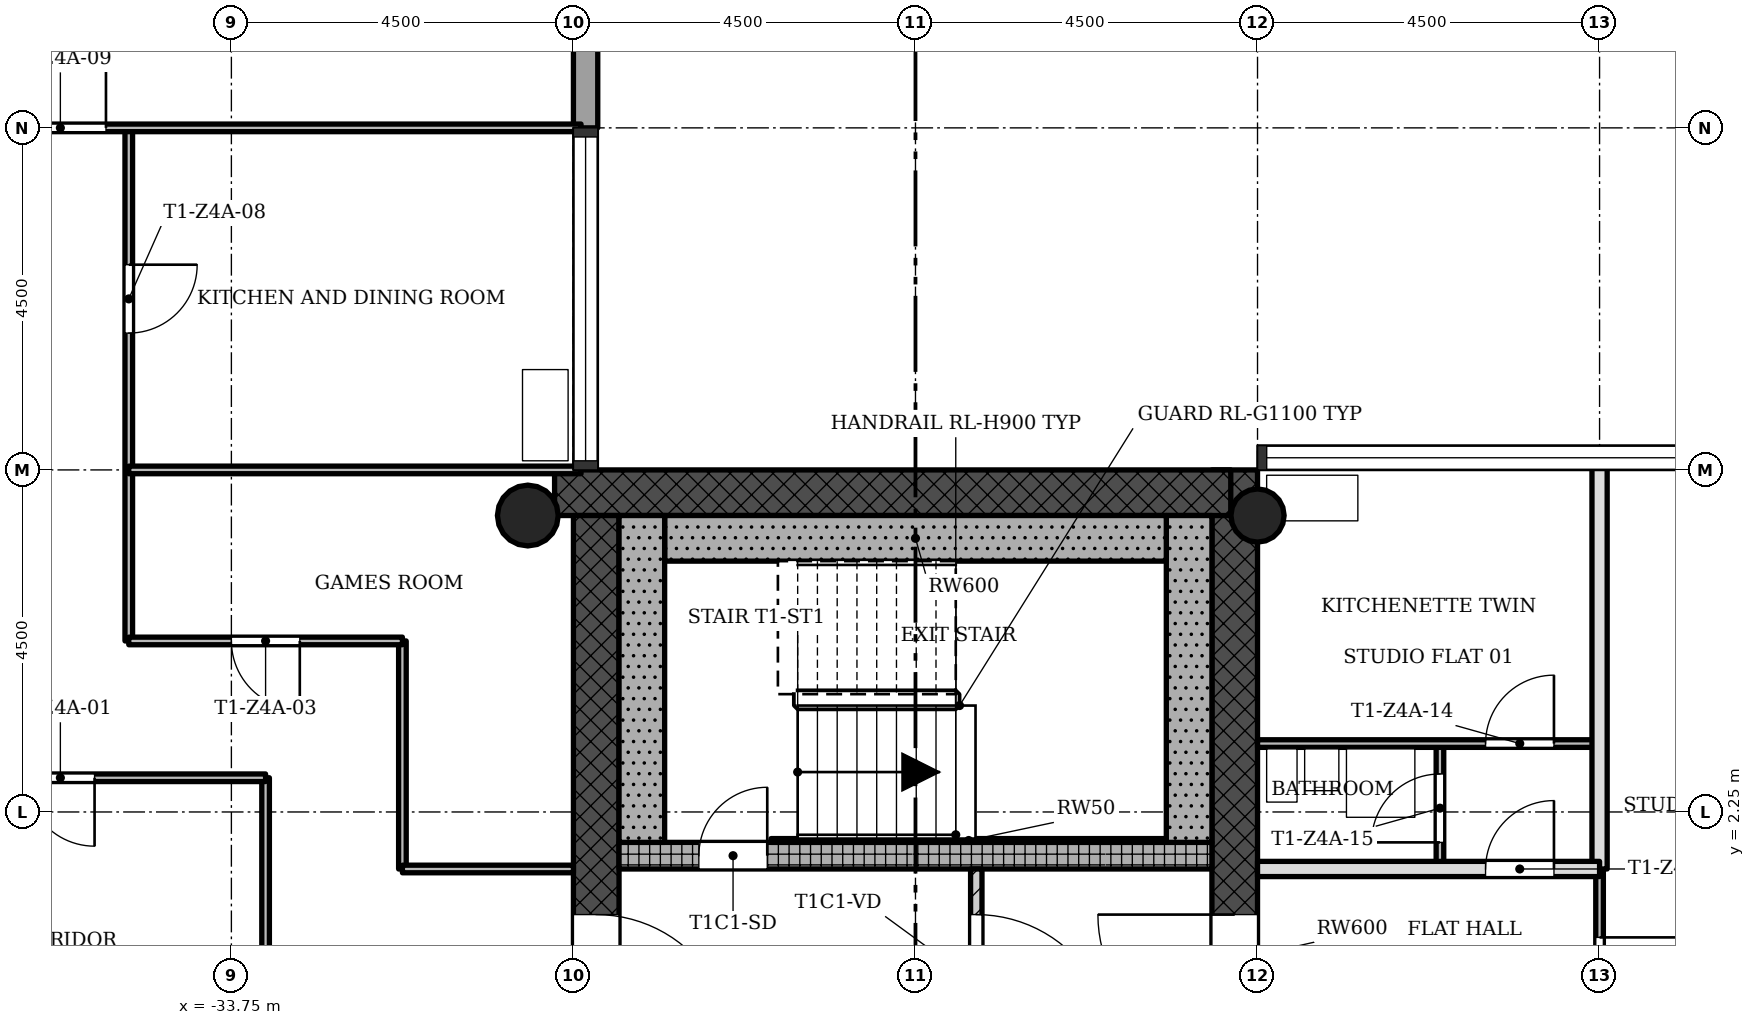
"""IFC4 building model, lengths in metres.
Left out: names, types, materials, properties, quantities, classifications, styles, units other than length and angle.
Written with IfcOpenShell. Run it as: python <this file> out.ifc"""

import sys

from ifc_helpers import new_model, si_unit, direction, frame, frame_2d, origin, origin_2d, place, context, subcontext, project, spatial, rectangle, hollow_circle, extrude, element, fill, save


model = new_model("IFC4")
c1 = context("Model", 3, precision=1e-05, world=origin(), true_north=direction((0.0, 1.0)))
c2 = subcontext(c1, "Body", "Model", "MODEL_VIEW")
j1 = project(units=[si_unit("LENGTHUNIT", "METRE"), si_unit("PLANEANGLEUNIT", "RADIAN")], contexts=[c1])
p1 = place(None, origin())
s1 = spatial("IfcSite", under=j1, at=p1, CompositionType="ELEMENT")
p2 = place(p1, origin())
s2 = spatial("IfcBuilding", under=s1, at=p2, CompositionType="ELEMENT")
p3 = place(p2, frame((0.0, 0.0, 226.6)))
s3 = spatial("IfcBuildingStorey", under=s2, at=p3, CompositionType="ELEMENT", Elevation=226.6)
p4 = place(p3, frame((-20.55, -6.15, 0.0), z_axis=(0.0, 0.0, 1.0), x_axis=(0.0, 1.0, 0.0)))
e1 = element("IfcWall", 1, at=p4, inside=s3, PredefinedType="SHEAR", context=c2, shape_type="SweptSolid", body=[
    extrude(rectangle(XDim=12.9, YDim=0.6, at=frame_2d((6.45, 0.0))), origin(), (0.0, 0.0, 1.0), 3.4),
])
p5 = place(p4, frame((5.25, 0.0, 0.0)))
e2 = element("IfcOpeningElement", 2, at=p5, cuts=e1, PredefinedType="OPENING", context=c2, shape_type="SweptSolid", body=[
    extrude(rectangle(XDim=1.8, YDim=2.1, at=frame_2d((0.9, 1.05))), frame((0.0, 0.31, 0.0), z_axis=(0.0, -1.0, 0.0), x_axis=(1.0, 0.0, 0.0)), (0.0, 0.0, 1.0), 0.62),
])
p6 = place(p3, frame((-20.602, 6.45, 0.0), z_axis=(0.0, 0.0, 1.0), x_axis=(-1.0, 0.0, 0.0)))
e3 = element("IfcWall", 3, at=p6, inside=s3, PredefinedType="SHEAR", context=c2, shape_type="SweptSolid", body=[
    extrude(rectangle(XDim=8.896, YDim=0.6, at=frame_2d((4.448, 0.0))), origin(), (0.0, 0.0, 1.0), 3.4),
])
p7 = place(p3, frame((-28.95, 6.15, 0.0), z_axis=(0.0, 0.0, 1.0), x_axis=(0.0, -1.0, 0.0)))
e4 = element("IfcWall", 4, at=p7, inside=s3, PredefinedType="SHEAR", context=c2, shape_type="SweptSolid", body=[
    extrude(rectangle(XDim=12.9, YDim=0.6, at=frame_2d((6.45, 0.0))), origin(), (0.0, 0.0, 1.0), 3.4),
])
p8 = place(p7, frame((5.25, 0.0, 0.0)))
e5 = element("IfcOpeningElement", 5, at=p8, cuts=e4, PredefinedType="OPENING", context=c2, shape_type="SweptSolid", body=[
    extrude(rectangle(XDim=1.8, YDim=2.1, at=frame_2d((0.9, 1.05))), frame((0.0, 0.31, 0.0), z_axis=(0.0, -1.0, 0.0), x_axis=(1.0, 0.0, 0.0)), (0.0, 0.0, 1.0), 0.62),
])
p9 = place(p3, frame((-28.65, 1.675, 0.0), z_axis=(0.0, 0.0, 1.0), x_axis=(1.0, 0.0, 0.0)))
e6 = element("IfcWall", 6, at=p9, inside=s3, PredefinedType="SHEAR", context=c2, shape_type="SweptSolid", body=[
    extrude(rectangle(XDim=7.8, YDim=0.35, at=frame_2d((3.9, 0.0))), origin(), (0.0, 0.0, 1.0), 3.4),
])
p10 = place(p9, frame((1.05, 0.0, 0.0)))
e7 = element("IfcOpeningElement", 7, at=p10, cuts=e6, PredefinedType="OPENING", context=c2, shape_type="SweptSolid", body=[
    extrude(rectangle(XDim=0.9, YDim=2.1, at=frame_2d((0.45, 1.05))), frame((0.0, 0.185, 0.0), z_axis=(0.0, -1.0, 0.0), x_axis=(1.0, 0.0, 0.0)), (0.0, 0.0, 1.0), 0.37),
])
p11 = place(p3, frame((-20.25, 6.15, 0.0), z_axis=(0.0, 0.0, 1.0), x_axis=(1.0, 0.0, 0.0)))
e8 = element("IfcColumn", 8, at=p11, inside=s3, PredefinedType="COLUMN", context=c2, shape_type="SweptSolid", body=[
    extrude(hollow_circle(Radius=0.35, WallThickness=0.025, at=origin_2d()), origin(), (0.0, 0.0, 1.0), 3.4),
])
p12 = place(p3, frame((-29.85, 6.15, 0.0), z_axis=(0.0, 0.0, 1.0), x_axis=(1.0, 0.0, 0.0)))
e9 = element("IfcColumn", 9, at=p12, inside=s3, PredefinedType="COLUMN", context=c2, shape_type="SweptSolid", body=[
    extrude(hollow_circle(Radius=0.4, WallThickness=0.028, at=origin_2d()), origin(), (0.0, 0.0, 1.0), 3.4),
])
p13 = place(p3, frame((-29.09, 11.25, -0.3), z_axis=(0.0, 0.0, 1.0), x_axis=(0.0, 1.0, 0.0)))
e10 = element("IfcWall", 10, at=p13, inside=s3, PredefinedType="STANDARD", context=c2, shape_type="SweptSolid", body=[
    extrude(rectangle(XDim=1.82, YDim=0.32, at=frame_2d((0.91, 0.0))), origin(), (0.0, 0.0, 1.0), 3.4),
])
p14 = place(p3, frame((-23.95, -1.5, 0.0), z_axis=(0.0, 0.0, 1.0), x_axis=(0.0, 1.0, 0.0)))
e11 = element("IfcWall", 11, at=p14, inside=s3, PredefinedType="PARTITIONING", context=c2, shape_type="SweptSolid", body=[
    extrude(rectangle(XDim=3.0, YDim=0.15, at=frame_2d((1.5, 0.0))), origin(), (0.0, 0.0, 1.0), 3.0),
])
p15 = place(p14, frame((0.6, 0.0, 0.0)))
e12 = element("IfcOpeningElement", 12, at=p15, cuts=e11, PredefinedType="OPENING", context=c2, shape_type="SweptSolid", body=[
    extrude(rectangle(XDim=1.8, YDim=2.1, at=frame_2d((0.9, 1.05))), frame((0.0, 0.085, 0.0), z_axis=(0.0, -1.0, 0.0), x_axis=(1.0, 0.0, 0.0)), (0.0, 0.0, 1.0), 0.17),
])
p16 = place(p3, frame((-35.1, 4.5, 0.0), z_axis=(0.0, 0.0, 1.0), x_axis=(0.0, 1.0, 0.0)))
e13 = element("IfcWall", 13, at=p16, inside=s3, PredefinedType="PARTITIONING", context=c2, shape_type="SweptSolid", body=[
    extrude(rectangle(XDim=6.75, YDim=0.1, at=frame_2d((3.375, 0.0))), origin(), (0.0, 0.0, 1.0), 3.0),
])
p17 = place(p16, frame((4.05, 0.0, 0.0)))
e14 = element("IfcOpeningElement", 14, at=p17, cuts=e13, PredefinedType="OPENING", context=c2, shape_type="SweptSolid", body=[
    extrude(rectangle(XDim=0.9, YDim=2.1, at=frame_2d((0.45, 1.05))), frame((0.0, 0.06, 0.0), z_axis=(0.0, -1.0, 0.0), x_axis=(1.0, 0.0, 0.0)), (0.0, 0.0, 1.0), 0.12),
])
p18 = place(p3, frame((-33.3, -2.7, 0.0), z_axis=(0.0, 0.0, 1.0), x_axis=(0.0, 1.0, 0.0)))
e15 = element("IfcWall", 15, at=p18, inside=s3, PredefinedType="PARTITIONING", context=c2, shape_type="SweptSolid", body=[
    extrude(rectangle(XDim=5.4, YDim=0.1, at=frame_2d((2.7, 0.0))), origin(), (0.0, 0.0, 1.0), 3.0),
])
p19 = place(p3, frame((-31.5, 1.5, 0.0), z_axis=(0.0, 0.0, 1.0), x_axis=(0.0, 1.0, 0.0)))
e16 = element("IfcWall", 16, at=p19, inside=s3, PredefinedType="PARTITIONING", context=c2, shape_type="SweptSolid", body=[
    extrude(rectangle(XDim=3.0, YDim=0.1, at=frame_2d((1.5, 0.0))), origin(), (0.0, 0.0, 1.0), 3.0),
])
p20 = place(p3, frame((-17.85, 1.5, 0.0), z_axis=(0.0, 0.0, 1.0), x_axis=(0.0, 1.0, 0.0)))
e17 = element("IfcWall", 17, at=p20, inside=s3, PredefinedType="PARTITIONING", context=c2, shape_type="SweptSolid", body=[
    extrude(rectangle(XDim=1.65, YDim=0.1, at=frame_2d((0.825, 0.0))), origin(), (0.0, 0.0, 1.0), 3.0),
])
p21 = place(p20, frame((0.35, 0.0, 0.0)))
e18 = element("IfcOpeningElement", 18, at=p21, cuts=e17, PredefinedType="OPENING", context=c2, shape_type="SweptSolid", body=[
    extrude(rectangle(XDim=0.9, YDim=2.1, at=frame_2d((0.45, 1.05))), frame((0.0, 0.06, 0.0), z_axis=(0.0, -1.0, 0.0), x_axis=(1.0, 0.0, 0.0)), (0.0, 0.0, 1.0), 0.12),
])
p22 = place(p3, frame((-15.75, -1.5, 0.0), z_axis=(0.0, 0.0, 1.0), x_axis=(0.0, 1.0, 0.0)))
e19 = element("IfcWall", 19, at=p22, inside=s3, PredefinedType="PARTITIONING", context=c2, shape_type="SweptSolid", body=[
    extrude(rectangle(XDim=3.0, YDim=0.1, at=frame_2d((1.5, 0.0))), origin(), (0.0, 0.0, 1.0), 3.0),
])
p23 = place(p22, frame((0.9, 0.0, 0.0)))
e20 = element("IfcOpeningElement", 20, at=p23, cuts=e19, PredefinedType="OPENING", context=c2, shape_type="SweptSolid", body=[
    extrude(rectangle(XDim=1.2, YDim=2.1, at=frame_2d((0.6, 1.05))), frame((0.0, 0.06, 0.0), z_axis=(0.0, -1.0, 0.0), x_axis=(1.0, 0.0, 0.0)), (0.0, 0.0, 1.0), 0.12),
])
p24 = place(p3, frame((-15.75, 1.5, 0.0), z_axis=(0.0, 0.0, 1.0), x_axis=(0.0, 1.0, 0.0)))
e21 = element("IfcWall", 21, at=p24, inside=s3, PredefinedType="SOLIDWALL", context=c2, shape_type="SweptSolid", body=[
    extrude(rectangle(XDim=5.35, YDim=0.2, at=frame_2d((2.675, 0.0))), origin(), (0.0, 0.0, 1.0), 3.0),
])
p25 = place(p3, frame((-31.5, 1.5, 0.0), z_axis=(0.0, 0.0, 1.0), x_axis=(1.0, 0.0, 0.0)))
e22 = element("IfcWall", 22, at=p25, inside=s3, PredefinedType="PARTITIONING", context=c2, shape_type="SweptSolid", body=[
    extrude(rectangle(XDim=2.25, YDim=0.1, at=frame_2d((1.125, 0.0))), origin(), (0.0, 0.0, 1.0), 3.0),
])
p26 = place(p3, frame((-20.25, 1.5, 0.0), z_axis=(0.0, 0.0, 1.0), x_axis=(1.0, 0.0, 0.0)))
e23 = element("IfcWall", 23, at=p26, inside=s3, PredefinedType="SOLIDWALL", context=c2, shape_type="SweptSolid", body=[
    extrude(rectangle(XDim=4.5, YDim=0.2, at=frame_2d((2.25, 0.0))), origin(), (0.0, 0.0, 1.0), 3.0),
])
p27 = place(p26, frame((3.0, 0.0, 0.0)))
e24 = element("IfcOpeningElement", 24, at=p27, cuts=e23, PredefinedType="OPENING", context=c2, shape_type="SweptSolid", body=[
    extrude(rectangle(XDim=0.9, YDim=2.1, at=frame_2d((0.45, 1.05))), frame((0.0, 0.11, 0.0), z_axis=(0.0, -1.0, 0.0), x_axis=(1.0, 0.0, 0.0)), (0.0, 0.0, 1.0), 0.22),
])
p28 = place(p3, frame((-38.7, 2.7, 0.0), z_axis=(0.0, 0.0, 1.0), x_axis=(1.0, 0.0, 0.0)))
e25 = element("IfcWall", 25, at=p28, inside=s3, PredefinedType="PARTITIONING", context=c2, shape_type="SweptSolid", body=[
    extrude(rectangle(XDim=5.4, YDim=0.1, at=frame_2d((2.7, 0.0))), origin(), (0.0, 0.0, 1.0), 3.0),
])
p29 = place(p28, frame((2.25, 0.0, 0.0)))
e26 = element("IfcOpeningElement", 26, at=p29, cuts=e25, PredefinedType="OPENING", context=c2, shape_type="SweptSolid", body=[
    extrude(rectangle(XDim=0.9, YDim=2.1, at=frame_2d((0.45, 1.05))), frame((0.0, 0.06, 0.0), z_axis=(0.0, -1.0, 0.0), x_axis=(1.0, 0.0, 0.0)), (0.0, 0.0, 1.0), 0.12),
])
p30 = place(p3, frame((-20.25, 3.15, 0.0), z_axis=(0.0, 0.0, 1.0), x_axis=(1.0, 0.0, 0.0)))
e27 = element("IfcWall", 27, at=p30, inside=s3, PredefinedType="PARTITIONING", context=c2, shape_type="SweptSolid", body=[
    extrude(rectangle(XDim=4.5, YDim=0.1, at=frame_2d((2.25, 0.0))), origin(), (0.0, 0.0, 1.0), 3.0),
])
p31 = place(p30, frame((3.0, 0.0, 0.0)))
e28 = element("IfcOpeningElement", 28, at=p31, cuts=e27, PredefinedType="OPENING", context=c2, shape_type="SweptSolid", body=[
    extrude(rectangle(XDim=0.9, YDim=2.1, at=frame_2d((0.45, 1.05))), frame((0.0, 0.06, 0.0), z_axis=(0.0, -1.0, 0.0), x_axis=(1.0, 0.0, 0.0)), (0.0, 0.0, 1.0), 0.12),
])
p32 = place(p3, frame((-35.1, 4.5, 0.0), z_axis=(0.0, 0.0, 1.0), x_axis=(1.0, 0.0, 0.0)))
e29 = element("IfcWall", 29, at=p32, inside=s3, PredefinedType="PARTITIONING", context=c2, shape_type="SweptSolid", body=[
    extrude(rectangle(XDim=3.6, YDim=0.1, at=frame_2d((1.8, 0.0))), origin(), (0.0, 0.0, 1.0), 3.0),
])
p33 = place(p32, frame((1.35, 0.0, 0.0)))
e30 = element("IfcOpeningElement", 30, at=p33, cuts=e29, PredefinedType="OPENING", context=c2, shape_type="SweptSolid", body=[
    extrude(rectangle(XDim=0.9, YDim=2.1, at=frame_2d((0.45, 1.05))), frame((0.0, 0.06, 0.0), z_axis=(0.0, -1.0, 0.0), x_axis=(1.0, 0.0, 0.0)), (0.0, 0.0, 1.0), 0.12),
])
p34 = place(p3, frame((-35.1, 6.75, 0.0), z_axis=(0.0, 0.0, 1.0), x_axis=(1.0, 0.0, 0.0)))
e31 = element("IfcWall", 31, at=p34, inside=s3, PredefinedType="PARTITIONING", context=c2, shape_type="SweptSolid", body=[
    extrude(rectangle(XDim=5.95, YDim=0.1, at=frame_2d((2.975, 0.0))), origin(), (0.0, 0.0, 1.0), 3.0),
])
p35 = place(p3, frame((-42.85, 11.25, 0.0), z_axis=(0.0, 0.0, 1.0), x_axis=(1.0, 0.0, 0.0)))
e32 = element("IfcWall", 32, at=p35, inside=s3, PredefinedType="PARTITIONING", context=c2, shape_type="SweptSolid", body=[
    extrude(rectangle(XDim=13.7, YDim=0.1, at=frame_2d((6.85, 0.0))), origin(), (0.0, 0.0, 1.0), 3.0),
])
p36 = place(p35, frame((6.25, 0.0, 0.0)))
e33 = element("IfcOpeningElement", 33, at=p36, cuts=e32, PredefinedType="OPENING", context=c2, shape_type="SweptSolid", body=[
    extrude(rectangle(XDim=1.2, YDim=2.1, at=frame_2d((0.6, 1.05))), frame((0.0, 0.06, 0.0), z_axis=(0.0, -1.0, 0.0), x_axis=(1.0, 0.0, 0.0)), (0.0, 0.0, 1.0), 0.12),
])
p37 = place(p3, frame((-21.15, 1.85, 0.0), z_axis=(0.0, 0.0, 1.0), x_axis=(0.0, 1.0, 0.0)))
e34 = element("IfcWall", 34, at=p37, inside=s3, PredefinedType="SHEAR", context=c2, shape_type="SweptSolid", body=[
    extrude(rectangle(XDim=4.3, YDim=0.6, at=frame_2d((2.15, 0.0))), origin(), (0.0, 0.0, 1.0), 3.4),
])
p38 = place(p3, frame((-28.05, 5.85, 0.0), z_axis=(0.0, 0.0, 1.0), x_axis=(1.0, 0.0, 0.0)))
e35 = element("IfcWall", 35, at=p38, inside=s3, PredefinedType="SHEAR", context=c2, shape_type="SweptSolid", body=[
    extrude(rectangle(XDim=6.6, YDim=0.6, at=frame_2d((3.3, 0.0))), origin(), (0.0, 0.0, 1.0), 3.4),
])
p39 = place(p3, frame((-28.35, 1.85, 0.0), z_axis=(0.0, 0.0, 1.0), x_axis=(0.0, 1.0, 0.0)))
e36 = element("IfcWall", 36, at=p39, inside=s3, PredefinedType="SHEAR", context=c2, shape_type="SweptSolid", body=[
    extrude(rectangle(XDim=4.3, YDim=0.6, at=frame_2d((2.15, 0.0))), origin(), (0.0, 0.0, 1.0), 3.4),
])
p40 = place(p3, frame((-26.65, 1.875, 0.0), z_axis=(0.0, 0.0, 1.0), x_axis=(1.0, 0.0, 0.0)))
e37 = element("IfcWall", 37, at=p40, inside=s3, PredefinedType="SHEAR", context=c2, shape_type="SweptSolid", body=[
    extrude(rectangle(XDim=5.2, YDim=0.05, at=frame_2d((2.6, 0.0))), origin(), (0.0, 0.0, 1.0), 3.4),
])
p41 = place(p15, origin())
e38 = element("IfcDoor", 38, at=p41, inside=s3, OperationType="SINGLE_SWING_LEFT", PredefinedType="DOOR", context=c2, shape_type="SweptSolid", body=[
    extrude(rectangle(XDim=1.8, YDim=2.1, at=frame_2d((0.9, 1.05))), frame((0.0, 0.025, 0.0), z_axis=(0.0, -1.0, 0.0), x_axis=(1.0, 0.0, 0.0)), (0.0, 0.0, 1.0), 0.05),
])
fill(e12, e38)
p42 = place(p29, origin())
e39 = element("IfcDoor", 39, at=p42, inside=s3, OperationType="SINGLE_SWING_RIGHT", PredefinedType="DOOR", context=c2, shape_type="SweptSolid", body=[
    extrude(rectangle(XDim=0.9, YDim=2.1, at=frame_2d((0.45, 1.05))), frame((0.0, 0.025, 0.0), z_axis=(0.0, -1.0, 0.0), x_axis=(1.0, 0.0, 0.0)), (0.0, 0.0, 1.0), 0.05),
])
fill(e26, e39)
p43 = place(p33, origin())
e40 = element("IfcDoor", 40, at=p43, inside=s3, OperationType="SINGLE_SWING_RIGHT", PredefinedType="DOOR", context=c2, shape_type="SweptSolid", body=[
    extrude(rectangle(XDim=0.9, YDim=2.1, at=frame_2d((0.45, 1.05))), frame((0.0, 0.025, 0.0), z_axis=(0.0, -1.0, 0.0), x_axis=(1.0, 0.0, 0.0)), (0.0, 0.0, 1.0), 0.05),
])
fill(e30, e40)
p44 = place(p17, origin())
e41 = element("IfcDoor", 41, at=p44, inside=s3, OperationType="SINGLE_SWING_RIGHT", PredefinedType="DOOR", context=c2, shape_type="SweptSolid", body=[
    extrude(rectangle(XDim=0.9, YDim=2.1, at=frame_2d((0.45, 1.05))), frame((0.0, 0.025, 0.0), z_axis=(0.0, -1.0, 0.0), x_axis=(1.0, 0.0, 0.0)), (0.0, 0.0, 1.0), 0.05),
])
fill(e14, e41)
p45 = place(p36, origin())
e42 = element("IfcDoor", 42, at=p45, inside=s3, OperationType="SINGLE_SWING_LEFT", PredefinedType="DOOR", context=c2, shape_type="SweptSolid", body=[
    extrude(rectangle(XDim=1.2, YDim=2.1, at=frame_2d((0.6, 1.05))), frame((0.0, 0.025, 0.0), z_axis=(0.0, -1.0, 0.0), x_axis=(1.0, 0.0, 0.0)), (0.0, 0.0, 1.0), 0.05),
])
fill(e33, e42)
p46 = place(p27, origin())
e43 = element("IfcDoor", 43, at=p46, inside=s3, OperationType="SINGLE_SWING_LEFT", PredefinedType="DOOR", context=c2, shape_type="SweptSolid", body=[
    extrude(rectangle(XDim=0.9, YDim=2.1, at=frame_2d((0.45, 1.05))), frame((0.0, 0.025, 0.0), z_axis=(0.0, -1.0, 0.0), x_axis=(1.0, 0.0, 0.0)), (0.0, 0.0, 1.0), 0.05),
])
fill(e24, e43)
p47 = place(p31, origin())
e44 = element("IfcDoor", 44, at=p47, inside=s3, OperationType="SINGLE_SWING_LEFT", PredefinedType="DOOR", context=c2, shape_type="SweptSolid", body=[
    extrude(rectangle(XDim=0.9, YDim=2.1, at=frame_2d((0.45, 1.05))), frame((0.0, 0.025, 0.0), z_axis=(0.0, -1.0, 0.0), x_axis=(1.0, 0.0, 0.0)), (0.0, 0.0, 1.0), 0.05),
])
fill(e28, e44)
p48 = place(p21, origin())
e45 = element("IfcDoor", 45, at=p48, inside=s3, OperationType="SINGLE_SWING_RIGHT", PredefinedType="DOOR", context=c2, shape_type="SweptSolid", body=[
    extrude(rectangle(XDim=0.9, YDim=2.1, at=frame_2d((0.45, 1.05))), frame((0.0, 0.025, 0.0), z_axis=(0.0, -1.0, 0.0), x_axis=(1.0, 0.0, 0.0)), (0.0, 0.0, 1.0), 0.05),
])
fill(e18, e45)
p49 = place(p23, origin())
e46 = element("IfcDoor", 46, at=p49, inside=s3, OperationType="SINGLE_SWING_RIGHT", PredefinedType="DOOR", context=c2, shape_type="SweptSolid", body=[
    extrude(rectangle(XDim=1.2, YDim=2.1, at=frame_2d((0.6, 1.05))), frame((0.0, 0.025, 0.0), z_axis=(0.0, -1.0, 0.0), x_axis=(1.0, 0.0, 0.0)), (0.0, 0.0, 1.0), 0.05),
])
fill(e20, e46)
p50 = place(p10, origin())
e47 = element("IfcDoor", 47, at=p50, inside=s3, OperationType="SINGLE_SWING_LEFT", PredefinedType="DOOR", context=c2, shape_type="SweptSolid", body=[
    extrude(rectangle(XDim=0.9, YDim=2.1, at=frame_2d((0.45, 1.05))), frame((0.0, 0.025, 0.0), z_axis=(0.0, -1.0, 0.0), x_axis=(1.0, 0.0, 0.0)), (0.0, 0.0, 1.0), 0.05),
])
fill(e7, e47)
p51 = place(p8, origin())
e48 = element("IfcDoor", 48, at=p51, inside=s3, OperationType="SINGLE_SWING_LEFT", PredefinedType="DOOR", context=c2, shape_type="SweptSolid", body=[
    extrude(rectangle(XDim=1.8, YDim=2.1, at=frame_2d((0.9, 1.05))), frame((0.0, 0.025, 0.0), z_axis=(0.0, -1.0, 0.0), x_axis=(1.0, 0.0, 0.0)), (0.0, 0.0, 1.0), 0.05),
])
fill(e5, e48)
p52 = place(p5, origin())
e49 = element("IfcDoor", 49, at=p52, inside=s3, OperationType="SINGLE_SWING_LEFT", PredefinedType="DOOR", context=c2, shape_type="SweptSolid", body=[
    extrude(rectangle(XDim=1.8, YDim=2.1, at=frame_2d((0.9, 1.05))), frame((0.0, 0.025, 0.0), z_axis=(0.0, -1.0, 0.0), x_axis=(1.0, 0.0, 0.0)), (0.0, 0.0, 1.0), 0.05),
])
fill(e2, e49)
save(model, sys.argv[1])
